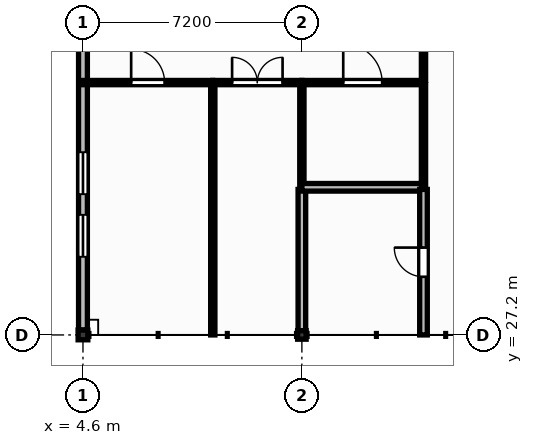
"""IFC4 building model, lengths in metres.
Left out: names, types, materials, properties, quantities, classifications, styles, units other than length and angle.
Written with IfcOpenShell. Run it as: python <this file> out.ifc"""

import sys

from ifc_helpers import new_model, si_unit, direction, frame, frame_2d, origin, origin_2d, place, context, subcontext, project, spatial, rectangle, extrude, element, fill, save


model = new_model("IFC4")
c1 = context("Model", 3, precision=1e-05, world=origin(), true_north=direction((0.0, 1.0)))
c2 = subcontext(c1, "Body", "Model", "MODEL_VIEW")
j1 = project(units=[si_unit("LENGTHUNIT", "METRE"), si_unit("PLANEANGLEUNIT", "RADIAN")], contexts=[c1])
p1 = place(None, origin())
s1 = spatial("IfcSite", under=j1, at=p1, CompositionType="ELEMENT")
p2 = place(p1, origin())
s2 = spatial("IfcBuilding", under=s1, at=p2, CompositionType="ELEMENT")
p3 = place(p2, frame((0.0, 0.0, 13.2)))
s3 = spatial("IfcBuildingStorey", under=s2, at=p3, CompositionType="ELEMENT", Elevation=13.2)
p4 = place(p3, frame((4.6, 27.2, 0.0), z_axis=(0.0, 0.0, 1.0), x_axis=(1.0, 0.0, 0.0)))
e1 = element("IfcColumn", 1, at=p4, inside=s3, PredefinedType="COLUMN", context=c2, shape_type="SweptSolid", body=[
    extrude(rectangle(XDim=0.32, YDim=0.32, at=origin_2d()), origin(), (0.0, 0.0, 1.0), 3.95),
])
p5 = place(p3, frame((11.8, 27.2, 0.0), z_axis=(0.0, 0.0, 1.0), x_axis=(1.0, 0.0, 0.0)))
e2 = element("IfcColumn", 2, at=p5, inside=s3, PredefinedType="COLUMN", context=c2, shape_type="SweptSolid", body=[
    extrude(rectangle(XDim=0.28, YDim=0.28, at=origin_2d()), origin(), (0.0, 0.0, 1.0), 3.95),
])
p6 = place(p3, frame((4.6, 27.36, 0.0), z_axis=(0.0, 0.0, 1.0), x_axis=(0.0, 1.0, 0.0)))
e3 = element("IfcWall", 3, at=p6, inside=s3, PredefinedType="SOLIDWALL", context=c2, shape_type="SweptSolid", body=[
    extrude(rectangle(XDim=9.3, YDim=0.29, at=frame_2d((4.65, 0.0))), origin(), (0.0, 0.0, 1.0), 3.49),
])
p7 = place(p6, frame((2.41, 0.0, 1.0)))
e4 = element("IfcOpeningElement", 4, at=p7, cuts=e3, PredefinedType="OPENING", context=c2, shape_type="SweptSolid", body=[
    extrude(rectangle(XDim=1.38, YDim=1.8, at=frame_2d((0.69, 0.9))), frame((0.0, 0.155, 0.0), z_axis=(0.0, -1.0, 0.0), x_axis=(1.0, 0.0, 0.0)), (0.0, 0.0, 1.0), 0.31),
])
p8 = place(p6, frame((4.47, 0.0, 1.0)))
e5 = element("IfcOpeningElement", 5, at=p8, cuts=e3, PredefinedType="OPENING", context=c2, shape_type="SweptSolid", body=[
    extrude(rectangle(XDim=1.38, YDim=1.8, at=frame_2d((0.69, 0.9))), frame((0.0, 0.155, 0.0), z_axis=(0.0, -1.0, 0.0), x_axis=(1.0, 0.0, 0.0)), (0.0, 0.0, 1.0), 0.31),
])
p9 = place(p3, frame((4.6, 35.5, 0.0), z_axis=(0.0, 0.0, 1.0), x_axis=(1.0, 0.0, 0.0)))
e6 = element("IfcWall", 6, at=p9, inside=s3, PredefinedType="PARTITIONING", context=c2, shape_type="SweptSolid", body=[
    extrude(rectangle(XDim=4.27, YDim=0.14, at=frame_2d((2.135, 0.0))), origin(), (0.0, 0.0, 1.0), 3.93),
])
p10 = place(p9, frame((1.585, 0.0, 0.0)))
e7 = element("IfcOpeningElement", 7, at=p10, cuts=e6, PredefinedType="OPENING", context=c2, shape_type="SweptSolid", body=[
    extrude(rectangle(XDim=1.1, YDim=2.1, at=frame_2d((0.55, 1.05))), frame((0.0, 0.08, 0.0), z_axis=(0.0, -1.0, 0.0), x_axis=(1.0, 0.0, 0.0)), (0.0, 0.0, 1.0), 0.16),
])
p11 = place(p3, frame((8.87, 27.2, 0.0), z_axis=(0.0, 0.0, 1.0), x_axis=(0.0, 1.0, 0.0)))
e8 = element("IfcWall", 8, at=p11, inside=s3, PredefinedType="PARTITIONING", context=c2, shape_type="SweptSolid", body=[
    extrude(rectangle(XDim=8.23, YDim=0.14, at=frame_2d((4.115, 0.0))), origin(), (0.0, 0.0, 1.0), 3.93),
])
p12 = place(p3, frame((8.87, 35.5, 0.0), z_axis=(0.0, 0.0, 1.0), x_axis=(1.0, 0.0, 0.0)))
e9 = element("IfcWall", 9, at=p12, inside=s3, PredefinedType="PARTITIONING", context=c2, shape_type="SweptSolid", body=[
    extrude(rectangle(XDim=2.93, YDim=0.14, at=frame_2d((1.465, 0.0))), origin(), (0.0, 0.0, 1.0), 3.93),
])
p13 = place(p12, frame((0.635, 0.0, 0.0)))
e10 = element("IfcOpeningElement", 10, at=p13, cuts=e9, PredefinedType="OPENING", context=c2, shape_type="SweptSolid", body=[
    extrude(rectangle(XDim=1.66, YDim=2.3, at=frame_2d((0.83, 1.15))), frame((0.0, 0.08, 0.0), z_axis=(0.0, -1.0, 0.0), x_axis=(1.0, 0.0, 0.0)), (0.0, 0.0, 1.0), 0.16),
])
p14 = place(p3, frame((11.8, 27.34, 0.0), z_axis=(0.0, 0.0, 1.0), x_axis=(0.0, 1.0, 0.0)))
e11 = element("IfcWall", 11, at=p14, inside=s3, PredefinedType="SOLIDWALL", context=c2, shape_type="SweptSolid", body=[
    extrude(rectangle(XDim=4.646, YDim=0.25, at=frame_2d((2.323, 0.0))), origin(), (0.0, 0.0, 1.0), 3.49),
])
p15 = place(p3, frame((11.8, 32.126, 0.0), z_axis=(0.0, 0.0, 1.0), x_axis=(0.0, 1.0, 0.0)))
e12 = element("IfcWall", 12, at=p15, inside=s3, PredefinedType="PARTITIONING", context=c2, shape_type="SweptSolid", body=[
    extrude(rectangle(XDim=3.304, YDim=0.14, at=frame_2d((1.652, 0.0))), origin(), (0.0, 0.0, 1.0), 3.49),
])
p16 = place(p3, frame((11.8, 32.056, 0.0), z_axis=(0.0, 0.0, 1.0), x_axis=(1.0, 0.0, 0.0)))
e13 = element("IfcWall", 13, at=p16, inside=s3, PredefinedType="SOLIDWALL", context=c2, shape_type="SweptSolid", body=[
    extrude(rectangle(XDim=4.0, YDim=0.25, at=frame_2d((2.0, 0.0))), origin(), (0.0, 0.0, 1.0), 3.93),
])
p17 = place(p3, frame((11.8, 35.5, 0.0), z_axis=(0.0, 0.0, 1.0), x_axis=(1.0, 0.0, 0.0)))
e14 = element("IfcWall", 14, at=p17, inside=s3, PredefinedType="PARTITIONING", context=c2, shape_type="SweptSolid", body=[
    extrude(rectangle(XDim=4.0, YDim=0.14, at=frame_2d((2.0, 0.0))), origin(), (0.0, 0.0, 1.0), 3.93),
])
p18 = place(p17, frame((1.36, 0.0, 0.0)))
e15 = element("IfcOpeningElement", 15, at=p18, cuts=e14, PredefinedType="OPENING", context=c2, shape_type="SweptSolid", body=[
    extrude(rectangle(XDim=1.28, YDim=2.2, at=frame_2d((0.64, 1.1))), frame((0.0, 0.08, 0.0), z_axis=(0.0, -1.0, 0.0), x_axis=(1.0, 0.0, 0.0)), (0.0, 0.0, 1.0), 0.16),
])
p19 = place(p3, frame((15.8, 27.2, 0.0), z_axis=(0.0, 0.0, 1.0), x_axis=(0.0, 1.0, 0.0)))
e16 = element("IfcWall", 16, at=p19, inside=s3, PredefinedType="SOLIDWALL", context=c2, shape_type="SweptSolid", body=[
    extrude(rectangle(XDim=4.786, YDim=0.25, at=frame_2d((2.393, 0.0))), origin(), (0.0, 0.0, 1.0), 3.93),
])
p20 = place(p19, frame((1.913, 0.0, 0.0)))
e17 = element("IfcOpeningElement", 17, at=p20, cuts=e16, PredefinedType="OPENING", context=c2, shape_type="SweptSolid", body=[
    extrude(rectangle(XDim=0.96, YDim=2.1, at=frame_2d((0.48, 1.05))), frame((0.0, 0.135, 0.0), z_axis=(0.0, -1.0, 0.0), x_axis=(1.0, 0.0, 0.0)), (0.0, 0.0, 1.0), 0.27),
])
p21 = place(p3, frame((15.8, 32.126, 0.0), z_axis=(0.0, 0.0, 1.0), x_axis=(0.0, 1.0, 0.0)))
e18 = element("IfcWall", 18, at=p21, inside=s3, PredefinedType="PARTITIONING", context=c2, shape_type="SweptSolid", body=[
    extrude(rectangle(XDim=3.304, YDim=0.14, at=frame_2d((1.652, 0.0))), origin(), (0.0, 0.0, 1.0), 3.93),
])
p22 = place(p3, frame((15.8, 35.57, 0.0), z_axis=(0.0, 0.0, 1.0), x_axis=(0.0, 1.0, 0.0)))
e19 = element("IfcWall", 19, at=p22, inside=s3, PredefinedType="PARTITIONING", context=c2, shape_type="SweptSolid", body=[
    extrude(rectangle(XDim=2.81, YDim=0.14, at=frame_2d((1.405, 0.0))), origin(), (0.0, 0.0, 1.0), 3.93),
])
p23 = place(p22, frame((0.955, 0.0, 0.0)))
e20 = element("IfcOpeningElement", 20, at=p23, cuts=e19, PredefinedType="OPENING", context=c2, shape_type="SweptSolid", body=[
    extrude(rectangle(XDim=0.9, YDim=2.1, at=frame_2d((0.45, 1.05))), frame((0.0, 0.08, 0.0), z_axis=(0.0, -1.0, 0.0), x_axis=(1.0, 0.0, 0.0)), (0.0, 0.0, 1.0), 0.16),
])
p24 = place(p7, origin())
e21 = element("IfcWindow", 21, at=p24, inside=s3, PartitioningType="SINGLE_PANEL", PredefinedType="WINDOW", context=c2, shape_type="SweptSolid", body=[
    extrude(rectangle(XDim=1.38, YDim=1.8, at=frame_2d((0.69, 0.9))), frame((0.0, 0.03, 0.0), z_axis=(0.0, -1.0, 0.0), x_axis=(1.0, 0.0, 0.0)), (0.0, 0.0, 1.0), 0.06),
])
fill(e4, e21)
p25 = place(p8, origin())
e22 = element("IfcWindow", 22, at=p25, inside=s3, PartitioningType="SINGLE_PANEL", PredefinedType="WINDOW", context=c2, shape_type="SweptSolid", body=[
    extrude(rectangle(XDim=1.38, YDim=1.8, at=frame_2d((0.69, 0.9))), frame((0.0, 0.03, 0.0), z_axis=(0.0, -1.0, 0.0), x_axis=(1.0, 0.0, 0.0)), (0.0, 0.0, 1.0), 0.06),
])
fill(e5, e22)
p26 = place(p10, origin())
e23 = element("IfcDoor", 23, at=p26, inside=s3, OperationType="SINGLE_SWING_LEFT", PredefinedType="DOOR", context=c2, shape_type="SweptSolid", body=[
    extrude(rectangle(XDim=1.1, YDim=2.1, at=frame_2d((0.55, 1.05))), frame((0.0, 0.025, 0.0), z_axis=(0.0, -1.0, 0.0), x_axis=(1.0, 0.0, 0.0)), (0.0, 0.0, 1.0), 0.05),
])
fill(e7, e23)
p27 = place(p13, origin())
e24 = element("IfcDoor", 24, at=p27, inside=s3, OperationType="DOUBLE_DOOR_SINGLE_SWING", PredefinedType="DOOR", context=c2, shape_type="SweptSolid", body=[
    extrude(rectangle(XDim=1.66, YDim=2.3, at=frame_2d((0.83, 1.15))), frame((0.0, 0.025, 0.0), z_axis=(0.0, -1.0, 0.0), x_axis=(1.0, 0.0, 0.0)), (0.0, 0.0, 1.0), 0.05),
])
fill(e10, e24)
p28 = place(p20, origin())
e25 = element("IfcDoor", 25, at=p28, inside=s3, OperationType="SINGLE_SWING_RIGHT", PredefinedType="DOOR", context=c2, shape_type="SweptSolid", body=[
    extrude(rectangle(XDim=0.96, YDim=2.1, at=frame_2d((0.48, 1.05))), frame((0.0, 0.025, 0.0), z_axis=(0.0, -1.0, 0.0), x_axis=(1.0, 0.0, 0.0)), (0.0, 0.0, 1.0), 0.05),
])
fill(e17, e25)
p29 = place(p18, origin())
e26 = element("IfcDoor", 26, at=p29, inside=s3, OperationType="SINGLE_SWING_LEFT", PredefinedType="DOOR", context=c2, shape_type="SweptSolid", body=[
    extrude(rectangle(XDim=1.28, YDim=2.2, at=frame_2d((0.64, 1.1))), frame((0.0, 0.025, 0.0), z_axis=(0.0, -1.0, 0.0), x_axis=(1.0, 0.0, 0.0)), (0.0, 0.0, 1.0), 0.05),
])
fill(e15, e26)
save(model, sys.argv[1])
